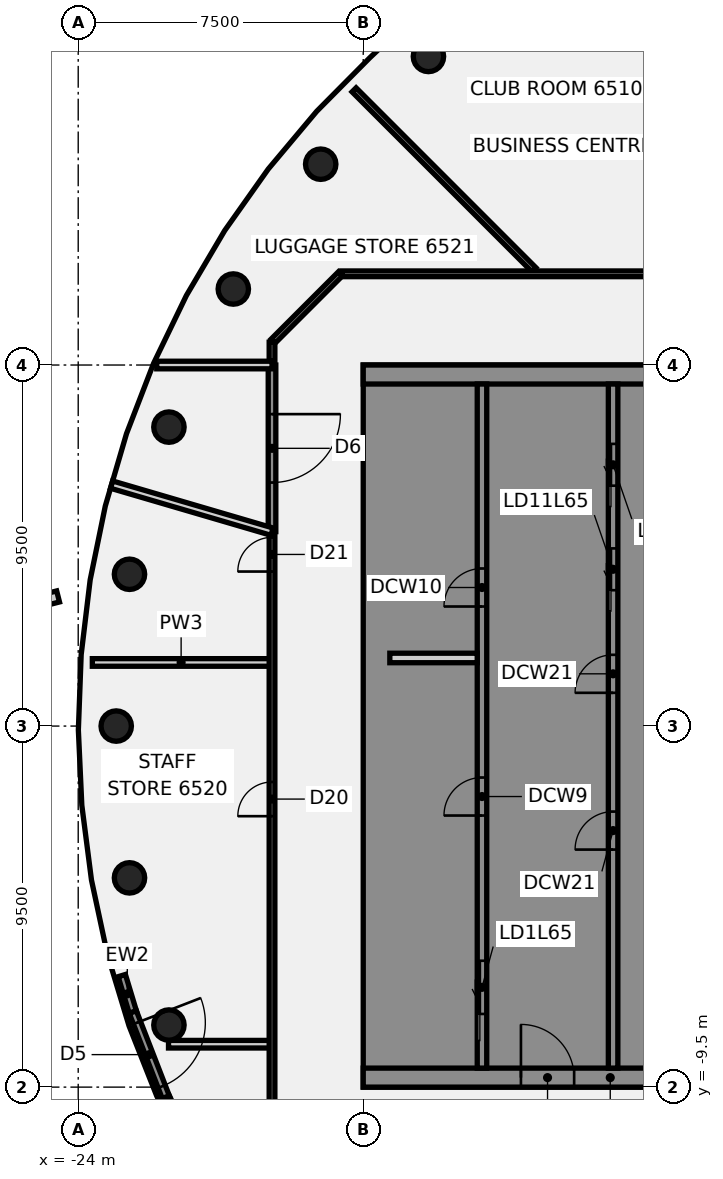
"""IFC4 building model, lengths in metres.
Left out: names, types, materials, properties, quantities, classifications, styles, units other than length and angle.
Written with IfcOpenShell. Run it as: python <this file> out.ifc"""

import sys

from ifc_helpers import new_model, si_unit, direction, frame, frame_2d, origin, origin_2d, place, context, subcontext, project, spatial, polyline, rectangle, circle, outline, extrude, element, fill, save


model = new_model("IFC4")
c1 = context("Model", 3, precision=1e-05, world=origin(), true_north=direction((0.0, 1.0)))
c2 = subcontext(c1, "Body", "Model", "MODEL_VIEW")
j1 = project(units=[si_unit("LENGTHUNIT", "METRE"), si_unit("PLANEANGLEUNIT", "RADIAN")], contexts=[c1])
p1 = place(None, origin())
s1 = spatial("IfcSite", under=j1, at=p1, CompositionType="ELEMENT")
p2 = place(p1, origin())
s2 = spatial("IfcBuilding", under=s1, at=p2, CompositionType="ELEMENT")
p3 = place(p2, frame((0.0, 0.0, 256.8)))
s3 = spatial("IfcBuildingStorey", under=s2, at=p3, CompositionType="ELEMENT", Elevation=256.8)
for number, where, z_axis, x_axis in (
    (1, (-14.784, 17.619, -0.14), (0.0, 0.0, 1.0), (1.0, 0.0, 0.0)),
    (2, (-17.619, 14.784, -0.14), (0.0, 0.0, 1.0), (1.0, 0.0, 0.0)),
    (3, (-19.919, 11.5, -0.14), (0.0, 0.0, 1.0), (1.0, 0.0, 0.0)),
    (4, (-21.613, 7.866, -0.14), (0.0, 0.0, 1.0), (1.0, 0.0, 0.0)),
    (5, (-22.651, 3.994, -0.14), (0.0, 0.0, 1.0), (1.0, 0.0, 0.0)),
    (6, (-23.0, 0.0, -0.14), (0.0, 0.0, 1.0), (1.0, 0.0, 0.0)),
    (7, (-22.651, -3.994, -0.14), (0.0, 0.0, 1.0), (1.0, 0.0, 0.0)),
    (8, (-21.613, -7.866, -0.14), (0.0, 0.0, 1.0), (1.0, 0.0, 0.0)),
):
    element("IfcColumn", number, at=place(p3, frame(where, z_axis=z_axis, x_axis=x_axis)), inside=s3, PredefinedType="COLUMN", context=c2, shape_type="SweptSolid", body=[
        extrude(circle(Radius=0.4, at=origin_2d()), origin(), (0.0, 0.0, 1.0), 3.6),
    ])
p4 = place(p3, frame((-16.74, 16.74, 0.0), z_axis=(0.0, 0.0, 1.0), x_axis=(0.707106781187, -0.707106781187, 0.0)))
e9 = element("IfcWall", 9, at=p4, inside=s3, PredefinedType="PARTITIONING", context=c2, shape_type="SweptSolid", body=[
    extrude(rectangle(XDim=6.691, YDim=0.15, at=frame_2d((3.345, 0.0))), origin(), (0.0, 0.0, 1.0), 2.864),
])
p5 = place(p3, frame((-11.424, 19.529, 0.0), z_axis=(0.0, 0.0, 1.0), x_axis=(0.880009979756, -0.474955193181, 0.0)))
e10 = element("IfcWall", 10, at=p5, inside=s3, PredefinedType="PARTITIONING", context=c2, shape_type="SweptSolid", body=[
    extrude(rectangle(XDim=15.808, YDim=0.15, at=frame_2d((7.904, 0.0))), origin(), (0.0, 0.0, 1.0), 2.864),
])
p6 = place(p5, frame((8.829, 0.0, 0.0)))
e11 = element("IfcOpeningElement", 11, at=p6, cuts=e10, PredefinedType="OPENING", context=c2, shape_type="SweptSolid", body=[
    extrude(rectangle(XDim=1.8, YDim=2.1, at=frame_2d((0.9, 1.05))), frame((0.0, 0.085, 0.0), z_axis=(0.0, -1.0, 0.0), x_axis=(1.0, 0.0, 0.0)), (0.0, 0.0, 1.0), 0.17),
])
p7 = place(p3, frame((-23.629, 1.674, 0.0), z_axis=(0.0, 0.0, 1.0), x_axis=(1.0, 0.0, 0.0)))
e12 = element("IfcWall", 12, at=p7, inside=s3, PredefinedType="PARTITIONING", context=c2, shape_type="SweptSolid", body=[
    extrude(rectangle(XDim=4.674, YDim=0.2, at=frame_2d((2.337, 0.0))), origin(), (0.0, 0.0, 1.0), 2.864),
])
p8 = place(p3, frame((-21.624, -8.371, 0.0), z_axis=(0.0, 0.0, 1.0), x_axis=(1.0, 0.0, 0.0)))
e13 = element("IfcWall", 13, at=p8, inside=s3, PredefinedType="PARTITIONING", context=c2, shape_type="SweptSolid", body=[
    extrude(rectangle(XDim=2.669, YDim=0.2, at=frame_2d((1.334, 0.0))), origin(), (0.0, 0.0, 1.0), 2.864),
])
p9 = place(p3, frame((-17.065, 11.9, 0.0), z_axis=(0.0, 0.0, 1.0), x_axis=(1.0, 0.0, 0.0)))
e14 = element("IfcWall", 14, at=p9, inside=s3, PredefinedType="PARTITIONING", context=c2, shape_type="SweptSolid", body=[
    extrude(rectangle(XDim=34.165, YDim=0.15, at=frame_2d((17.083, 0.0))), origin(), (0.0, 0.0, 1.0), 2.864),
])
p10 = place(p9, frame((22.777, 0.0, 0.0)))
e15 = element("IfcOpeningElement", 15, at=p10, cuts=e14, PredefinedType="OPENING", context=c2, shape_type="SweptSolid", body=[
    extrude(rectangle(XDim=1.8, YDim=2.1, at=frame_2d((0.9, 1.05))), frame((0.0, 0.085, 0.0), z_axis=(0.0, -1.0, 0.0), x_axis=(1.0, 0.0, 0.0)), (0.0, 0.0, 1.0), 0.17),
])
p11 = place(p9, frame((31.665, 0.0, 0.0)))
e16 = element("IfcOpeningElement", 16, at=p11, cuts=e14, PredefinedType="OPENING", context=c2, shape_type="SweptSolid", body=[
    extrude(rectangle(XDim=0.9, YDim=2.1, at=frame_2d((0.45, 1.05))), frame((0.0, 0.085, 0.0), z_axis=(0.0, -1.0, 0.0), x_axis=(1.0, 0.0, 0.0)), (0.0, 0.0, 1.0), 0.17),
])
p12 = place(p9, frame((11.615, 0.0, 0.0)))
e17 = element("IfcOpeningElement", 17, at=p12, cuts=e14, PredefinedType="OPENING", context=c2, shape_type="SweptSolid", body=[
    extrude(rectangle(XDim=1.8, YDim=2.1, at=frame_2d((0.9, 1.05))), frame((0.0, 0.085, 0.0), z_axis=(0.0, -1.0, 0.0), x_axis=(1.0, 0.0, 0.0)), (0.0, 0.0, 1.0), 0.17),
])
p13 = place(p3, frame((-18.872, 10.128, 0.0), z_axis=(0.0, 0.0, 1.0), x_axis=(0.707106781187, 0.707106781187, 0.0)))
e18 = element("IfcWall", 18, at=p13, inside=s3, PredefinedType="PARTITIONING", context=c2, shape_type="SweptSolid", body=[
    extrude(rectangle(XDim=2.505, YDim=0.15, at=frame_2d((1.253, 0.0))), origin(), (0.0, 0.0, 1.0), 2.864),
])
p14 = place(p3, frame((-18.9, -10.1, 0.0), z_axis=(0.0, 0.0, 1.0), x_axis=(0.0, 1.0, 0.0)))
e19 = element("IfcWall", 19, at=p14, inside=s3, PredefinedType="PARTITIONING", context=c2, shape_type="SweptSolid", body=[
    extrude(rectangle(XDim=15.116, YDim=0.15, at=frame_2d((7.558, 0.0))), origin(), (0.0, 0.0, 1.0), 2.864),
])
p15 = place(p14, frame((7.729, 0.0, 0.0)))
e20 = element("IfcOpeningElement", 20, at=p15, cuts=e19, PredefinedType="OPENING", context=c2, shape_type="SweptSolid", body=[
    extrude(rectangle(XDim=0.9, YDim=2.1, at=frame_2d((0.45, 1.05))), frame((0.0, 0.085, 0.0), z_axis=(0.0, -1.0, 0.0), x_axis=(1.0, 0.0, 0.0)), (0.0, 0.0, 1.0), 0.17),
])
p16 = place(p14, frame((14.166, 0.0, 0.0)))
e21 = element("IfcOpeningElement", 21, at=p16, cuts=e19, PredefinedType="OPENING", context=c2, shape_type="SweptSolid", body=[
    extrude(rectangle(XDim=0.9, YDim=2.1, at=frame_2d((0.45, 1.05))), frame((0.0, 0.085, 0.0), z_axis=(0.0, -1.0, 0.0), x_axis=(1.0, 0.0, 0.0)), (0.0, 0.0, 1.0), 0.17),
])
p17 = place(p3, frame((-18.9, 9.6, 0.0), z_axis=(0.0, 0.0, 1.0), x_axis=(0.0, 1.0, 0.0)))
e22 = element("IfcWall", 22, at=p17, inside=s3, PredefinedType="PARTITIONING", context=c2, shape_type="SweptSolid", body=[
    extrude(rectangle(XDim=0.5, YDim=0.15, at=frame_2d((0.25, 0.0))), origin(), (0.0, 0.0, 1.0), 2.864),
])
for number, where, z_axis, x_axis in (
    (23, (-22.854, -6.565, 0.0), (0.0, 0.0, 1.0), (0.289, -0.957, 0.0)),
    (24, (-21.696, -9.762, 0.0), (0.0, 0.0, 1.0), (0.443, -0.897, 0.0)),
):
    element("IfcWall", number, at=place(p3, frame(where, z_axis=z_axis, x_axis=x_axis)), inside=s3, PredefinedType="SOLIDWALL", context=c2, shape_type="SweptSolid", body=[
        extrude(rectangle(XDim=1.004, YDim=0.2, at=frame_2d((0.502, 0.0))), origin(), (0.0, 0.0, 1.0), 3.46),
    ])
p18 = place(p3, frame((-22.563, -7.526, 0.0), z_axis=(0.0, 0.0, 1.0), x_axis=(0.361542300479, -0.932355707316, 0.0)))
e25 = element("IfcWall", 25, at=p18, inside=s3, PredefinedType="SOLIDWALL", context=c2, shape_type="SweptSolid", body=[
    extrude(rectangle(XDim=2.399, YDim=0.2, at=frame_2d((1.199, 0.0))), origin(), (0.0, 0.0, 1.0), 3.46),
])
p19 = place(p18, frame((0.3, 0.0, 0.0)))
e26 = element("IfcOpeningElement", 26, at=p19, cuts=e25, PredefinedType="OPENING", context=c2, shape_type="SweptSolid", body=[
    extrude(rectangle(XDim=1.8, YDim=2.4, at=frame_2d((0.9, 1.2))), frame((0.0, 0.11, 0.0), z_axis=(0.0, -1.0, 0.0), x_axis=(1.0, 0.0, 0.0)), (0.0, 0.0, 1.0), 0.22),
])
p20 = place(p3, frame((-18.9, 9.5, 0.0), z_axis=(0.0, 0.0, 1.0), x_axis=(0.0, -1.0, 0.0)))
e27 = element("IfcWall", 27, at=p20, inside=s3, PredefinedType="SOLIDWALL", context=c2, shape_type="SweptSolid", body=[
    extrude(rectangle(XDim=4.384, YDim=0.2, at=frame_2d((2.192, 0.0))), origin(), (0.0, 0.0, 1.0), 2.964),
])
p21 = place(p20, frame((1.292, 0.0, 0.0)))
e28 = element("IfcOpeningElement", 28, at=p21, cuts=e27, PredefinedType="OPENING", context=c2, shape_type="SweptSolid", body=[
    extrude(rectangle(XDim=1.8, YDim=2.4, at=frame_2d((0.9, 1.2))), frame((0.0, 0.11, 0.0), z_axis=(0.0, -1.0, 0.0), x_axis=(1.0, 0.0, 0.0)), (0.0, 0.0, 1.0), 0.22),
])
p22 = place(p3, frame((-18.9, 9.5, 0.0), z_axis=(0.0, 0.0, 1.0), x_axis=(-1.0, 0.0, 0.0)))
e29 = element("IfcWall", 29, at=p22, inside=s3, PredefinedType="SOLIDWALL", context=c2, shape_type="SweptSolid", body=[
    extrude(rectangle(XDim=3.033, YDim=0.2, at=frame_2d((1.517, 0.0))), origin(), (0.0, 0.0, 1.0), 3.46),
])
p23 = place(p3, frame((-18.9, 5.116, 0.0), z_axis=(0.0, 0.0, 1.0), x_axis=(-0.959638098495, 0.281237835146, 0.0)))
e30 = element("IfcWall", 30, at=p23, inside=s3, PredefinedType="SOLIDWALL", context=c2, shape_type="SweptSolid", body=[
    extrude(rectangle(XDim=4.399, YDim=0.2, at=frame_2d((2.2, 0.0))), origin(), (0.0, 0.0, 1.0), 3.46),
])
p24 = place(p3, frame((-24.53, 3.41, 0.0), z_axis=(0.0, 0.0, 1.0), x_axis=(-0.968975116265, -0.247158297573, 0.0)))
e31 = element("IfcWall", 31, at=p24, inside=s3, PredefinedType="PARAPET", context=c2, shape_type="SweptSolid", body=[
    extrude(rectangle(XDim=2.471, YDim=0.3, at=frame_2d((1.236, 0.0))), origin(), (0.0, 0.0, 1.0), 1.1),
])
p25 = place(p3, frame((-16.5, -9.25, 0.0), z_axis=(0.0, 0.0, 1.0), x_axis=(1.0, 0.0, 0.0)))
e32 = element("IfcWall", 32, at=p25, inside=s3, PredefinedType="SHEAR", context=c2, shape_type="SweptSolid", body=[
    extrude(rectangle(XDim=13.0, YDim=0.5, at=frame_2d((6.5, 0.0))), origin(), (0.0, 0.0, 1.0), 3.46),
])
p26 = place(p25, frame((4.15, 0.0, 0.0)))
e33 = element("IfcOpeningElement", 33, at=p26, cuts=e32, PredefinedType="OPENING", context=c2, shape_type="SweptSolid", body=[
    extrude(rectangle(XDim=1.4, YDim=2.1, at=frame_2d((0.7, 1.05))), frame((0.0, 0.26, 0.0), z_axis=(0.0, -1.0, 0.0), x_axis=(1.0, 0.0, 0.0)), (0.0, 0.0, 1.0), 0.52),
])
p27 = place(p25, frame((10.125, 0.0, 0.0)))
e34 = element("IfcOpeningElement", 34, at=p27, cuts=e32, PredefinedType="OPENING", context=c2, shape_type="SweptSolid", body=[
    extrude(rectangle(XDim=1.4, YDim=2.1, at=frame_2d((0.7, 1.05))), frame((0.0, 0.26, 0.0), z_axis=(0.0, -1.0, 0.0), x_axis=(1.0, 0.0, 0.0)), (0.0, 0.0, 1.0), 0.52),
])
p28 = place(p3, origin())
e35 = element("IfcWall", 35, at=p28, inside=s3, PredefinedType="SHEAR", context=c2, shape_type="SweptSolid", body=[
    extrude(outline(polyline([(-13.5, -8.125), (-16.0, -8.125), (-16.0, -5.625), (-13.5, -5.625), (-13.5, -5.375), (-16.0, -5.375), (-16.0, 5.375), (-13.5, 5.375), (-13.5, 5.625), (-16.0, 5.625), (-16.0, 8.125), (-13.5, 8.125), (-13.5, 9.0), (-16.0, 9.0), (-16.5, 9.0), (-16.5, -9.0), (-16.0, -9.0), (-13.5, -9.0), (-13.5, -8.125)])), origin(), (0.0, 0.0, 1.0), 3.46),
])
p29 = place(p3, frame((-16.5, 9.25, 0.0), z_axis=(0.0, 0.0, 1.0), x_axis=(1.0, 0.0, 0.0)))
e36 = element("IfcWall", 36, at=p29, inside=s3, PredefinedType="SHEAR", context=c2, shape_type="SweptSolid", body=[
    extrude(rectangle(XDim=13.0, YDim=0.5, at=frame_2d((6.5, 0.0))), origin(), (0.0, 0.0, 1.0), 3.46),
])
p30 = place(p3, origin())
e37 = element("IfcWall", 37, at=p30, inside=s3, PredefinedType="SHEAR", context=c2, shape_type="SweptSolid", body=[
    extrude(outline(polyline([(-9.8, -5.375), (-9.8, -5.625), (-7.5, -5.625), (-7.25, -5.625), (-7.25, 9.0), (-7.5, 9.0), (-9.8, 9.0), (-9.8, 8.125), (-7.5, 8.125), (-7.5, 5.625), (-9.8, 5.625), (-9.8, 5.375), (-7.5, 5.375), (-7.5, 2.875), (-9.8, 2.875), (-9.8, 2.625), (-7.5, 2.625), (-7.5, -5.375), (-9.8, -5.375)])), origin(), (0.0, 0.0, 1.0), 3.46),
])
p31 = place(p3, origin())
e38 = element("IfcWall", 38, at=p31, inside=s3, PredefinedType="SHEAR", context=c2, shape_type="SweptSolid", body=[
    extrude(outline(polyline([(-7.5, -8.125), (-9.55, -8.125), (-9.55, -5.625), (-9.8, -5.625), (-9.8, -8.125), (-9.8, -9.0), (-7.5, -9.0), (-7.5, -8.125)])), origin(), (0.0, 0.0, 1.0), 3.46),
])
p32 = place(p3, frame((-13.375, -9.0, 0.0), z_axis=(0.0, 0.0, 1.0), x_axis=(0.0, 1.0, 0.0)))
e39 = element("IfcWall", 39, at=p32, inside=s3, PredefinedType="SHEAR", context=c2, shape_type="SweptSolid", body=[
    extrude(rectangle(XDim=18.0, YDim=0.25, at=frame_2d((9.0, 0.0))), origin(), (0.0, 0.0, 1.0), 3.46),
])
p33 = place(p32, frame((1.425, 0.0, 0.0)))
e40 = element("IfcOpeningElement", 40, at=p33, cuts=e39, PredefinedType="OPENING", context=c2, shape_type="SweptSolid", body=[
    extrude(rectangle(XDim=1.4, YDim=2.1, at=frame_2d((0.7, 1.05))), frame((0.0, 0.135, 0.0), z_axis=(0.0, -1.0, 0.0), x_axis=(1.0, 0.0, 0.0)), (0.0, 0.0, 1.0), 0.27),
])
p34 = place(p32, frame((6.646, 0.0, 0.0)))
e41 = element("IfcOpeningElement", 41, at=p34, cuts=e39, PredefinedType="OPENING", context=c2, shape_type="SweptSolid", body=[
    extrude(rectangle(XDim=1.0, YDim=2.1, at=frame_2d((0.5, 1.05))), frame((0.0, 0.135, 0.0), z_axis=(0.0, -1.0, 0.0), x_axis=(1.0, 0.0, 0.0)), (0.0, 0.0, 1.0), 0.27),
])
p35 = place(p32, frame((12.146, 0.0, 0.0)))
e42 = element("IfcOpeningElement", 42, at=p35, cuts=e39, PredefinedType="OPENING", context=c2, shape_type="SweptSolid", body=[
    extrude(rectangle(XDim=1.0, YDim=2.1, at=frame_2d((0.5, 1.05))), frame((0.0, 0.135, 0.0), z_axis=(0.0, -1.0, 0.0), x_axis=(1.0, 0.0, 0.0)), (0.0, 0.0, 1.0), 0.27),
])
p36 = place(p3, frame((-9.925, -9.0, 0.0), z_axis=(0.0, 0.0, 1.0), x_axis=(0.0, 1.0, 0.0)))
e43 = element("IfcWall", 43, at=p36, inside=s3, PredefinedType="SHEAR", context=c2, shape_type="SweptSolid", body=[
    extrude(rectangle(XDim=18.0, YDim=0.25, at=frame_2d((9.0, 0.0))), origin(), (0.0, 0.0, 1.0), 3.46),
])
p37 = place(p36, frame((12.575, 0.0, 0.0)))
e44 = element("IfcOpeningElement", 44, at=p37, cuts=e43, PredefinedType="OPENING", context=c2, shape_type="SweptSolid", body=[
    extrude(rectangle(XDim=1.1, YDim=2.1, at=frame_2d((0.55, 1.05))), frame((0.0, 0.135, 0.0), z_axis=(0.0, -1.0, 0.0), x_axis=(1.0, 0.0, 0.0)), (0.0, 0.0, 1.0), 0.27),
])
p38 = place(p36, frame((15.325, 0.0, 0.0)))
e45 = element("IfcOpeningElement", 45, at=p38, cuts=e43, PredefinedType="OPENING", context=c2, shape_type="SweptSolid", body=[
    extrude(rectangle(XDim=1.1, YDim=2.1, at=frame_2d((0.55, 1.05))), frame((0.0, 0.135, 0.0), z_axis=(0.0, -1.0, 0.0), x_axis=(1.0, 0.0, 0.0)), (0.0, 0.0, 1.0), 0.27),
])
p39 = place(p36, frame((5.75, 0.0, 0.0)))
e46 = element("IfcOpeningElement", 46, at=p39, cuts=e43, PredefinedType="OPENING", context=c2, shape_type="SweptSolid", body=[
    extrude(rectangle(XDim=1.0, YDim=2.1, at=frame_2d((0.5, 1.05))), frame((0.0, 0.135, 0.0), z_axis=(0.0, -1.0, 0.0), x_axis=(1.0, 0.0, 0.0)), (0.0, 0.0, 1.0), 0.27),
])
p40 = place(p36, frame((9.875, 0.0, 0.0)))
e47 = element("IfcOpeningElement", 47, at=p40, cuts=e43, PredefinedType="OPENING", context=c2, shape_type="SweptSolid", body=[
    extrude(rectangle(XDim=1.0, YDim=2.1, at=frame_2d((0.5, 1.05))), frame((0.0, 0.135, 0.0), z_axis=(0.0, -1.0, 0.0), x_axis=(1.0, 0.0, 0.0)), (0.0, 0.0, 1.0), 0.27),
])
p41 = place(p3, frame((-15.8, 1.792, 0.0), z_axis=(0.0, 0.0, 1.0), x_axis=(1.0, 0.0, 0.0)))
e48 = element("IfcWall", 48, at=p41, inside=s3, PredefinedType="PARTITIONING", context=c2, shape_type="SweptSolid", body=[
    extrude(rectangle(XDim=2.3, YDim=0.25, at=frame_2d((1.15, 0.0))), origin(), (0.0, 0.0, 1.0), 3.46),
])
p42 = place(p15, origin())
e49 = element("IfcDoor", 49, at=p42, inside=s3, OperationType="SINGLE_SWING_LEFT", PredefinedType="DOOR", context=c2, shape_type="SweptSolid", body=[
    extrude(rectangle(XDim=0.9, YDim=2.1, at=frame_2d((0.45, 1.05))), frame((0.0, 0.025, 0.0), z_axis=(0.0, -1.0, 0.0), x_axis=(1.0, 0.0, 0.0)), (0.0, 0.0, 1.0), 0.05),
])
fill(e20, e49)
p43 = place(p16, origin())
e50 = element("IfcDoor", 50, at=p43, inside=s3, OperationType="SINGLE_SWING_LEFT", PredefinedType="DOOR", context=c2, shape_type="SweptSolid", body=[
    extrude(rectangle(XDim=0.9, YDim=2.1, at=frame_2d((0.45, 1.05))), frame((0.0, 0.025, 0.0), z_axis=(0.0, -1.0, 0.0), x_axis=(1.0, 0.0, 0.0)), (0.0, 0.0, 1.0), 0.05),
])
fill(e21, e50)
p44 = place(p19, frame((1.8, 0.0, 0.0), z_axis=(0.0, 0.0, 1.0), x_axis=(-1.0, 0.0, 0.0)))
e51 = element("IfcDoor", 51, at=p44, inside=s3, OperationType="SINGLE_SWING_LEFT", PredefinedType="DOOR", context=c2, shape_type="SweptSolid", body=[
    extrude(rectangle(XDim=1.8, YDim=2.4, at=frame_2d((0.9, 1.2))), frame((0.0, 0.025, 0.0), z_axis=(0.0, -1.0, 0.0), x_axis=(1.0, 0.0, 0.0)), (0.0, 0.0, 1.0), 0.05),
])
fill(e26, e51)
p45 = place(p21, origin())
e52 = element("IfcDoor", 52, at=p45, inside=s3, OperationType="SINGLE_SWING_LEFT", PredefinedType="DOOR", context=c2, shape_type="SweptSolid", body=[
    extrude(rectangle(XDim=1.8, YDim=2.4, at=frame_2d((0.9, 1.2))), frame((0.0, 0.025, 0.0), z_axis=(0.0, -1.0, 0.0), x_axis=(1.0, 0.0, 0.0)), (0.0, 0.0, 1.0), 0.05),
])
fill(e28, e52)
p46 = place(p26, origin())
e53 = element("IfcDoor", 53, at=p46, inside=s3, OperationType="SINGLE_SWING_LEFT", PredefinedType="DOOR", context=c2, shape_type="SweptSolid", body=[
    extrude(rectangle(XDim=1.4, YDim=2.1, at=frame_2d((0.7, 1.05))), frame((0.0, 0.025, 0.0), z_axis=(0.0, -1.0, 0.0), x_axis=(1.0, 0.0, 0.0)), (0.0, 0.0, 1.0), 0.05),
])
fill(e33, e53)
p47 = place(p33, origin())
e54 = element("IfcDoor", 54, at=p47, inside=s3, OperationType="SLIDING_TO_LEFT", PredefinedType="DOOR", context=c2, shape_type="SweptSolid", body=[
    extrude(rectangle(XDim=1.4, YDim=2.1, at=frame_2d((0.7, 1.05))), frame((0.0, 0.025, 0.0), z_axis=(0.0, -1.0, 0.0), x_axis=(1.0, 0.0, 0.0)), (0.0, 0.0, 1.0), 0.05),
])
fill(e40, e54)
p48 = place(p37, origin())
e55 = element("IfcDoor", 55, at=p48, inside=s3, OperationType="SLIDING_TO_LEFT", PredefinedType="DOOR", context=c2, shape_type="SweptSolid", body=[
    extrude(rectangle(XDim=1.1, YDim=2.1, at=frame_2d((0.55, 1.05))), frame((0.0, 0.025, 0.0), z_axis=(0.0, -1.0, 0.0), x_axis=(1.0, 0.0, 0.0)), (0.0, 0.0, 1.0), 0.05),
])
fill(e44, e55)
p49 = place(p38, origin())
e56 = element("IfcDoor", 56, at=p49, inside=s3, OperationType="SLIDING_TO_LEFT", PredefinedType="DOOR", context=c2, shape_type="SweptSolid", body=[
    extrude(rectangle(XDim=1.1, YDim=2.1, at=frame_2d((0.55, 1.05))), frame((0.0, 0.025, 0.0), z_axis=(0.0, -1.0, 0.0), x_axis=(1.0, 0.0, 0.0)), (0.0, 0.0, 1.0), 0.05),
])
fill(e45, e56)
p50 = place(p34, origin())
e57 = element("IfcDoor", 57, at=p50, inside=s3, OperationType="SINGLE_SWING_LEFT", PredefinedType="DOOR", context=c2, shape_type="SweptSolid", body=[
    extrude(rectangle(XDim=1.0, YDim=2.1, at=frame_2d((0.5, 1.05))), frame((0.0, 0.025, 0.0), z_axis=(0.0, -1.0, 0.0), x_axis=(1.0, 0.0, 0.0)), (0.0, 0.0, 1.0), 0.05),
])
fill(e41, e57)
p51 = place(p35, origin())
e58 = element("IfcDoor", 58, at=p51, inside=s3, OperationType="SINGLE_SWING_LEFT", PredefinedType="DOOR", context=c2, shape_type="SweptSolid", body=[
    extrude(rectangle(XDim=1.0, YDim=2.1, at=frame_2d((0.5, 1.05))), frame((0.0, 0.025, 0.0), z_axis=(0.0, -1.0, 0.0), x_axis=(1.0, 0.0, 0.0)), (0.0, 0.0, 1.0), 0.05),
])
fill(e42, e58)
p52 = place(p39, origin())
e59 = element("IfcDoor", 59, at=p52, inside=s3, OperationType="SINGLE_SWING_LEFT", PredefinedType="DOOR", context=c2, shape_type="SweptSolid", body=[
    extrude(rectangle(XDim=1.0, YDim=2.1, at=frame_2d((0.5, 1.05))), frame((0.0, 0.025, 0.0), z_axis=(0.0, -1.0, 0.0), x_axis=(1.0, 0.0, 0.0)), (0.0, 0.0, 1.0), 0.05),
])
fill(e46, e59)
p53 = place(p40, origin())
e60 = element("IfcDoor", 60, at=p53, inside=s3, OperationType="SINGLE_SWING_LEFT", PredefinedType="DOOR", context=c2, shape_type="SweptSolid", body=[
    extrude(rectangle(XDim=1.0, YDim=2.1, at=frame_2d((0.5, 1.05))), frame((0.0, 0.025, 0.0), z_axis=(0.0, -1.0, 0.0), x_axis=(1.0, 0.0, 0.0)), (0.0, 0.0, 1.0), 0.05),
])
fill(e47, e60)
save(model, sys.argv[1])
